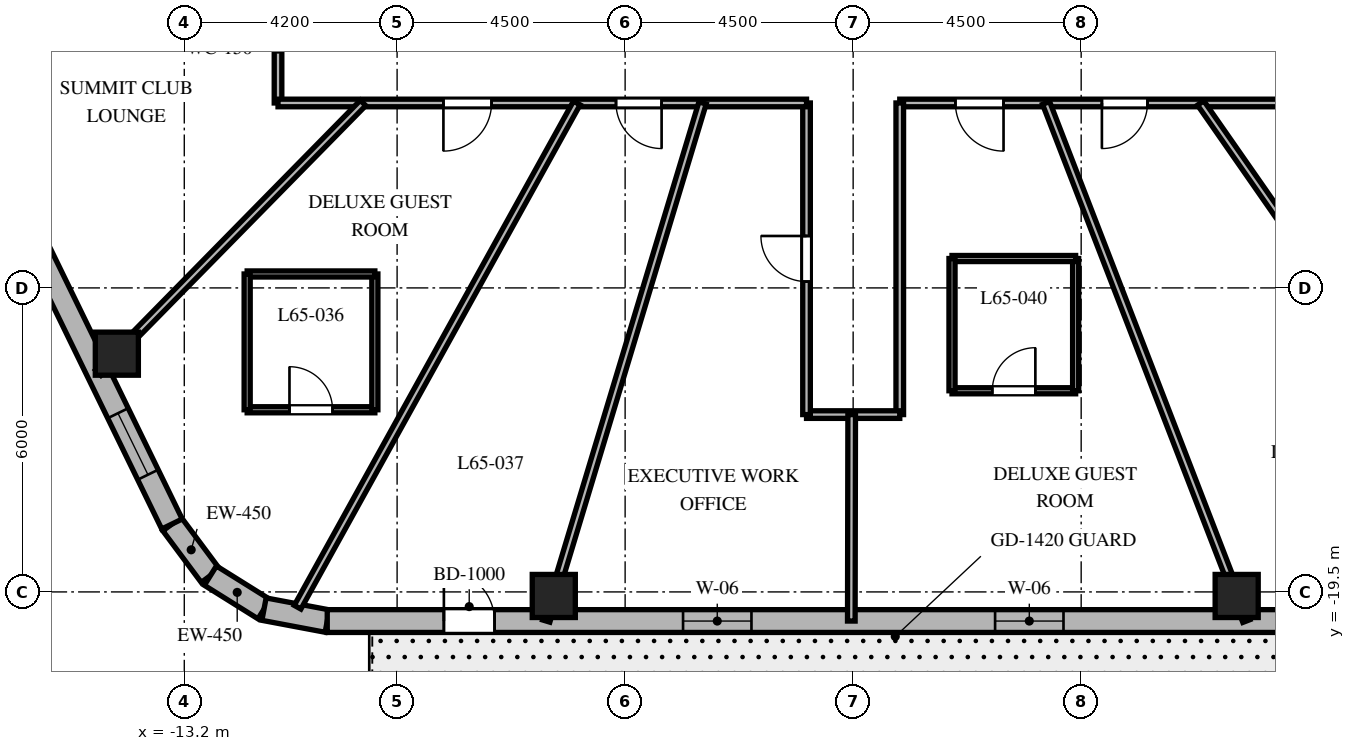
"""IFC4 building model, lengths in metres.
Left out: names, types, materials, properties, quantities, classifications, styles, units other than length and angle.
Written with IfcOpenShell. Run it as: python <this file> out.ifc"""

import sys

from ifc_helpers import new_model, si_unit, direction, frame, frame_2d, origin, origin_2d, place, context, subcontext, project, spatial, rectangle, extrude, element, fill, save


model = new_model("IFC4")
c1 = context("Model", 3, precision=1e-05, world=origin(), true_north=direction((0.0, 1.0)))
c2 = subcontext(c1, "Body", "Model", "MODEL_VIEW")
j1 = project(units=[si_unit("LENGTHUNIT", "METRE"), si_unit("PLANEANGLEUNIT", "RADIAN")], contexts=[c1])
p1 = place(None, origin())
s1 = spatial("IfcSite", under=j1, at=p1, CompositionType="ELEMENT")
p2 = place(p1, origin())
s2 = spatial("IfcBuilding", under=s1, at=p2, CompositionType="ELEMENT")
p3 = place(p2, frame((0.0, 0.0, 261.3)))
s3 = spatial("IfcBuildingStorey", under=s2, at=p3, CompositionType="ELEMENT", Elevation=261.3)
for number, where, z_axis, x_axis in (
    (1, (-5.908, -19.58, 0.0), (0.0, 0.0, 1.0), (1.0, 0.0, 0.0)),
    (2, (7.569, -19.58, 0.0), (0.0, 0.0, 1.0), (1.0, 0.0, 0.0)),
    (3, (-14.531, -14.798, 0.0), (0.0, 0.0, 1.0), (1.0, 0.0, 0.0)),
):
    element("IfcColumn", number, at=place(p3, frame(where, z_axis=z_axis, x_axis=x_axis)), inside=s3, PredefinedType="COLUMN", context=c2, shape_type="SweptSolid", body=[
        extrude(rectangle(XDim=0.85, YDim=0.85, at=origin_2d()), origin(), (0.0, 0.0, 1.0), 3.9),
    ])
p4 = place(p3, frame((-13.443, -18.16, 0.0), z_axis=(0.0, 0.0, 1.0), x_axis=(0.597042425808, -0.802209661987, 0.0)))
e4 = element("IfcWall", 4, at=p4, inside=s3, PredefinedType="SOLIDWALL", context=c2, shape_type="SweptSolid", body=[
    extrude(rectangle(XDim=1.27, YDim=0.45, at=frame_2d((0.635, 0.0))), origin(), (0.0, 0.0, 1.0), 3.6),
])
p5 = place(p3, frame((-12.685, -19.178, 0.0), z_axis=(0.0, 0.0, 1.0), x_axis=(0.848031272749, -0.529946186362, 0.0)))
e5 = element("IfcWall", 5, at=p5, inside=s3, PredefinedType="SOLIDWALL", context=c2, shape_type="SweptSolid", body=[
    extrude(rectangle(XDim=1.248, YDim=0.45, at=frame_2d((0.624, 0.0))), origin(), (0.0, 0.0, 1.0), 3.6),
])
p6 = place(p3, frame((-11.626, -19.84, 0.0), z_axis=(0.0, 0.0, 1.0), x_axis=(0.982701956681, -0.185194126083, 0.0)))
e6 = element("IfcWall", 6, at=p6, inside=s3, PredefinedType="SOLIDWALL", context=c2, shape_type="SweptSolid", body=[
    extrude(rectangle(XDim=1.27, YDim=0.45, at=frame_2d((0.635, 0.0))), origin(), (0.0, 0.0, 1.0), 3.6),
])
p7 = place(p3, frame((-10.379, -20.075, 0.0), z_axis=(0.0, 0.0, 1.0), x_axis=(1.0, 0.0, 0.0)))
e7 = element("IfcWall", 7, at=p7, inside=s3, PredefinedType="SOLIDWALL", context=c2, shape_type="SweptSolid", body=[
    extrude(rectangle(XDim=22.417, YDim=0.45, at=frame_2d((11.208, 0.0))), origin(), (0.0, 0.0, 1.0), 3.6),
])
p8 = place(p7, frame((2.302, 0.0, 0.0)))
e8 = element("IfcOpeningElement", 8, at=p8, cuts=e7, PredefinedType="OPENING", context=c2, shape_type="SweptSolid", body=[
    extrude(rectangle(XDim=1.0, YDim=2.15, at=frame_2d((0.5, 1.075))), frame((0.0, 0.235, 0.0), z_axis=(0.0, -1.0, 0.0), x_axis=(1.0, 0.0, 0.0)), (0.0, 0.0, 1.0), 0.47),
])
p9 = place(p7, frame((7.022, 0.0, 0.8)))
e9 = element("IfcOpeningElement", 9, at=p9, cuts=e7, PredefinedType="OPENING", context=c2, shape_type="SweptSolid", body=[
    extrude(rectangle(XDim=1.35, YDim=1.75, at=frame_2d((0.675, 0.875))), frame((0.0, 0.235, 0.0), z_axis=(0.0, -1.0, 0.0), x_axis=(1.0, 0.0, 0.0)), (0.0, 0.0, 1.0), 0.47),
])
p10 = place(p7, frame((13.18, 0.0, 0.8)))
e10 = element("IfcOpeningElement", 10, at=p10, cuts=e7, PredefinedType="OPENING", context=c2, shape_type="SweptSolid", body=[
    extrude(rectangle(XDim=1.35, YDim=1.75, at=frame_2d((0.675, 0.875))), frame((0.0, 0.235, 0.0), z_axis=(0.0, -1.0, 0.0), x_axis=(1.0, 0.0, 0.0)), (0.0, 0.0, 1.0), 0.47),
])
p11 = place(p7, frame((19.587, 0.0, 0.8)))
e11 = element("IfcOpeningElement", 11, at=p11, cuts=e7, PredefinedType="OPENING", context=c2, shape_type="SweptSolid", body=[
    extrude(rectangle(XDim=1.35, YDim=1.75, at=frame_2d((0.675, 0.875))), frame((0.0, 0.235, 0.0), z_axis=(0.0, -1.0, 0.0), x_axis=(1.0, 0.0, 0.0)), (0.0, 0.0, 1.0), 0.47),
])
p12 = place(p3, frame((-21.138, -2.371, 0.0), z_axis=(0.0, 0.0, 1.0), x_axis=(0.438128124058, -0.89891253574, 0.0)))
e12 = element("IfcWall", 12, at=p12, inside=s3, PredefinedType="SOLIDWALL", context=c2, shape_type="SweptSolid", body=[
    extrude(rectangle(XDim=17.565, YDim=0.45, at=frame_2d((8.782, 0.0))), origin(), (0.0, 0.0, 1.0), 3.6),
])
p13 = place(p12, frame((1.133, 0.0, 0.8)))
e13 = element("IfcOpeningElement", 13, at=p13, cuts=e12, PredefinedType="OPENING", context=c2, shape_type="SweptSolid", body=[
    extrude(rectangle(XDim=1.35, YDim=1.75, at=frame_2d((0.675, 0.875))), frame((0.0, 0.235, 0.0), z_axis=(0.0, -1.0, 0.0), x_axis=(1.0, 0.0, 0.0)), (0.0, 0.0, 1.0), 0.47),
])
p14 = place(p12, frame((8.158, 0.0, 0.8)))
e14 = element("IfcOpeningElement", 14, at=p14, cuts=e12, PredefinedType="OPENING", context=c2, shape_type="SweptSolid", body=[
    extrude(rectangle(XDim=1.35, YDim=1.75, at=frame_2d((0.675, 0.875))), frame((0.0, 0.235, 0.0), z_axis=(0.0, -1.0, 0.0), x_axis=(1.0, 0.0, 0.0)), (0.0, 0.0, 1.0), 0.47),
])
p15 = place(p12, frame((15.132, 0.0, 0.8)))
e15 = element("IfcOpeningElement", 15, at=p15, cuts=e12, PredefinedType="OPENING", context=c2, shape_type="SweptSolid", body=[
    extrude(rectangle(XDim=1.35, YDim=1.75, at=frame_2d((0.675, 0.875))), frame((0.0, 0.235, 0.0), z_axis=(0.0, -1.0, 0.0), x_axis=(1.0, 0.0, 0.0)), (0.0, 0.0, 1.0), 0.47),
])
p16 = place(p3, frame((-11.35, -9.85, 0.0), z_axis=(0.0, 0.0, 1.0), x_axis=(0.0, 1.0, 0.0)))
e16 = element("IfcWall", 16, at=p16, inside=s3, PredefinedType="PARTITIONING", context=c2, shape_type="SweptSolid", body=[
    extrude(rectangle(XDim=12.4, YDim=0.15, at=frame_2d((6.2, 0.0))), origin(), (0.0, 0.0, 1.0), 3.09),
])
p17 = place(p16, frame((10.333, 0.0, 0.0)))
e17 = element("IfcOpeningElement", 17, at=p17, cuts=e16, PredefinedType="OPENING", context=c2, shape_type="SweptSolid", body=[
    extrude(rectangle(XDim=0.9, YDim=2.03, at=frame_2d((0.45, 1.015))), frame((0.0, 0.085, 0.0), z_axis=(0.0, -1.0, 0.0), x_axis=(1.0, 0.0, 0.0)), (0.0, 0.0, 1.0), 0.17),
])
p18 = place(p16, frame((7.697, 0.0, 0.0)))
e18 = element("IfcOpeningElement", 18, at=p18, cuts=e16, PredefinedType="OPENING", context=c2, shape_type="SweptSolid", body=[
    extrude(rectangle(XDim=0.95, YDim=2.03, at=frame_2d((0.475, 1.015))), frame((0.0, 0.085, 0.0), z_axis=(0.0, -1.0, 0.0), x_axis=(1.0, 0.0, 0.0)), (0.0, 0.0, 1.0), 0.17),
])
p19 = place(p16, frame((2.998, 0.0, 0.0)))
e19 = element("IfcOpeningElement", 19, at=p19, cuts=e16, PredefinedType="OPENING", context=c2, shape_type="SweptSolid", body=[
    extrude(rectangle(XDim=0.95, YDim=2.03, at=frame_2d((0.475, 1.015))), frame((0.0, 0.085, 0.0), z_axis=(0.0, -1.0, 0.0), x_axis=(1.0, 0.0, 0.0)), (0.0, 0.0, 1.0), 0.17),
])
p20 = place(p3, frame((11.35, -9.85, 0.0), z_axis=(0.0, 0.0, 1.0), x_axis=(-1.0, 0.0, 0.0)))
e20 = element("IfcWall", 20, at=p20, inside=s3, PredefinedType="PARTITIONING", context=c2, shape_type="SweptSolid", body=[
    extrude(rectangle(XDim=10.43, YDim=0.15, at=frame_2d((5.215, 0.0))), origin(), (0.0, 0.0, 1.0), 3.09),
])
p21 = place(p20, frame((8.382, 0.0, 0.0)))
e21 = element("IfcOpeningElement", 21, at=p21, cuts=e20, PredefinedType="OPENING", context=c2, shape_type="SweptSolid", body=[
    extrude(rectangle(XDim=0.95, YDim=2.03, at=frame_2d((0.475, 1.015))), frame((0.0, 0.085, 0.0), z_axis=(0.0, -1.0, 0.0), x_axis=(1.0, 0.0, 0.0)), (0.0, 0.0, 1.0), 0.17),
])
p22 = place(p20, frame((5.541, 0.0, 0.0)))
e22 = element("IfcOpeningElement", 22, at=p22, cuts=e20, PredefinedType="OPENING", context=c2, shape_type="SweptSolid", body=[
    extrude(rectangle(XDim=0.9, YDim=2.03, at=frame_2d((0.45, 1.015))), frame((0.0, 0.085, 0.0), z_axis=(0.0, -1.0, 0.0), x_axis=(1.0, 0.0, 0.0)), (0.0, 0.0, 1.0), 0.17),
])
p23 = place(p20, frame((1.916, 0.0, 0.0)))
e23 = element("IfcOpeningElement", 23, at=p23, cuts=e20, PredefinedType="OPENING", context=c2, shape_type="SweptSolid", body=[
    extrude(rectangle(XDim=0.9, YDim=2.03, at=frame_2d((0.45, 1.015))), frame((0.0, 0.085, 0.0), z_axis=(0.0, -1.0, 0.0), x_axis=(1.0, 0.0, 0.0)), (0.0, 0.0, 1.0), 0.17),
])
p24 = place(p3, frame((0.92, -9.85, 0.0), z_axis=(0.0, 0.0, 1.0), x_axis=(0.0, -1.0, 0.0)))
e24 = element("IfcWall", 24, at=p24, inside=s3, PredefinedType="PARTITIONING", context=c2, shape_type="SweptSolid", body=[
    extrude(rectangle(XDim=6.15, YDim=0.15, at=frame_2d((3.075, 0.0))), origin(), (0.0, 0.0, 1.0), 3.041),
])
p25 = place(p3, frame((0.92, -16.0, 0.0), z_axis=(0.0, 0.0, 1.0), x_axis=(-1.0, 0.0, 0.0)))
e25 = element("IfcWall", 25, at=p25, inside=s3, PredefinedType="PARTITIONING", context=c2, shape_type="SweptSolid", body=[
    extrude(rectangle(XDim=1.84, YDim=0.15, at=frame_2d((0.92, 0.0))), origin(), (0.0, 0.0, 1.0), 3.6),
])
p26 = place(p3, frame((-0.92, -16.0, 0.0), z_axis=(0.0, 0.0, 1.0), x_axis=(0.0, 1.0, 0.0)))
e26 = element("IfcWall", 26, at=p26, inside=s3, PredefinedType="PARTITIONING", context=c2, shape_type="SweptSolid", body=[
    extrude(rectangle(XDim=6.15, YDim=0.15, at=frame_2d((3.075, 0.0))), origin(), (0.0, 0.0, 1.0), 3.041),
])
p27 = place(p26, frame((2.625, 0.0, 0.0)))
e27 = element("IfcOpeningElement", 27, at=p27, cuts=e26, PredefinedType="OPENING", context=c2, shape_type="SweptSolid", body=[
    extrude(rectangle(XDim=0.9, YDim=2.03, at=frame_2d((0.45, 1.015))), frame((0.0, 0.085, 0.0), z_axis=(0.0, -1.0, 0.0), x_axis=(1.0, 0.0, 0.0)), (0.0, 0.0, 1.0), 0.17),
])
p28 = place(p3, frame((-0.92, -9.85, 0.0), z_axis=(0.0, 0.0, 1.0), x_axis=(-1.0, 0.0, 0.0)))
e28 = element("IfcWall", 28, at=p28, inside=s3, PredefinedType="PARTITIONING", context=c2, shape_type="SweptSolid", body=[
    extrude(rectangle(XDim=10.43, YDim=0.15, at=frame_2d((5.215, 0.0))), origin(), (0.0, 0.0, 1.0), 3.09),
])
p29 = place(p28, frame((6.216, 0.0, 0.0)))
e29 = element("IfcOpeningElement", 29, at=p29, cuts=e28, PredefinedType="OPENING", context=c2, shape_type="SweptSolid", body=[
    extrude(rectangle(XDim=0.95, YDim=2.03, at=frame_2d((0.475, 1.015))), frame((0.0, 0.085, 0.0), z_axis=(0.0, -1.0, 0.0), x_axis=(1.0, 0.0, 0.0)), (0.0, 0.0, 1.0), 0.17),
])
p30 = place(p28, frame((2.86, 0.0, 0.0)))
e30 = element("IfcOpeningElement", 30, at=p30, cuts=e28, PredefinedType="OPENING", context=c2, shape_type="SweptSolid", body=[
    extrude(rectangle(XDim=0.9, YDim=2.03, at=frame_2d((0.45, 1.015))), frame((0.0, 0.085, 0.0), z_axis=(0.0, -1.0, 0.0), x_axis=(1.0, 0.0, 0.0)), (0.0, 0.0, 1.0), 0.17),
])
p31 = place(p3, frame((-9.672, -9.85, 0.0), z_axis=(0.0, 0.0, 1.0), x_axis=(-0.700629771301, -0.713524998558, 0.0)))
e31 = element("IfcWall", 31, at=p31, inside=s3, PredefinedType="PARTITIONING", context=c2, shape_type="SweptSolid", body=[
    extrude(rectangle(XDim=7.459, YDim=0.15, at=frame_2d((3.73, 0.0))), origin(), (0.0, 0.0, 1.0), 2.94),
])
p32 = place(p3, frame((-5.454, -9.85, 0.0), z_axis=(0.0, 0.0, 1.0), x_axis=(-0.48439420613, -0.874849846012, 0.0)))
e32 = element("IfcWall", 32, at=p32, inside=s3, PredefinedType="PARTITIONING", context=c2, shape_type="SweptSolid", body=[
    extrude(rectangle(XDim=11.375, YDim=0.15, at=frame_2d((5.688, 0.0))), origin(), (0.0, 0.0, 1.0), 2.94),
])
p33 = place(p3, frame((-2.972, -9.85, 0.0), z_axis=(0.0, 0.0, 1.0), x_axis=(-0.288872169679, -0.957367677324, 0.0)))
e33 = element("IfcWall", 33, at=p33, inside=s3, PredefinedType="PARTITIONING", context=c2, shape_type="SweptSolid", body=[
    extrude(rectangle(XDim=10.68, YDim=0.15, at=frame_2d((5.34, 0.0))), origin(), (0.0, 0.0, 1.0), 2.94),
])
p34 = place(p3, frame((-0.029, -16.0, 0.0), z_axis=(0.0, 0.0, 1.0), x_axis=(-0.001797372928, -0.999998384724, 0.0)))
e34 = element("IfcWall", 34, at=p34, inside=s3, PredefinedType="PARTITIONING", context=c2, shape_type="SweptSolid", body=[
    extrude(rectangle(XDim=4.075, YDim=0.15, at=frame_2d((2.038, 0.0))), origin(), (0.0, 0.0, 1.0), 2.94),
])
p35 = place(p3, frame((3.808, -9.85, 0.0), z_axis=(0.0, 0.0, 1.0), x_axis=(0.360587327934, -0.932725457427, 0.0)))
e35 = element("IfcWall", 35, at=p35, inside=s3, PredefinedType="PARTITIONING", context=c2, shape_type="SweptSolid", body=[
    extrude(rectangle(XDim=10.962, YDim=0.15, at=frame_2d((5.481, 0.0))), origin(), (0.0, 0.0, 1.0), 2.94),
])
p36 = place(p3, frame((6.858, -9.85, 0.0), z_axis=(0.0, 0.0, 1.0), x_axis=(0.571391702066, -0.820677477948, 0.0)))
e36 = element("IfcWall", 36, at=p36, inside=s3, PredefinedType="PARTITIONING", context=c2, shape_type="SweptSolid", body=[
    extrude(rectangle(XDim=11.738, YDim=0.15, at=frame_2d((5.869, 0.0))), origin(), (0.0, 0.0, 1.0), 2.94),
])
p37 = place(p3, frame((-11.959, -15.905, 0.0), z_axis=(0.0, 0.0, 1.0), x_axis=(1.0, 0.0, 0.0)))
e37 = element("IfcWall", 37, at=p37, inside=s3, PredefinedType="PARTITIONING", context=c2, shape_type="SweptSolid", body=[
    extrude(rectangle(XDim=2.52, YDim=0.12, at=frame_2d((1.26, 0.0))), origin(), (0.0, 0.0, 1.0), 3.6),
])
p38 = place(p37, frame((0.835, 0.0, 0.0)))
e38 = element("IfcOpeningElement", 38, at=p38, cuts=e37, PredefinedType="OPENING", context=c2, shape_type="SweptSolid", body=[
    extrude(rectangle(XDim=0.85, YDim=2.03, at=frame_2d((0.425, 1.015))), frame((0.0, 0.07, 0.0), z_axis=(0.0, -1.0, 0.0), x_axis=(1.0, 0.0, 0.0)), (0.0, 0.0, 1.0), 0.14),
])
p39 = place(p3, frame((-9.439, -15.905, 0.0), z_axis=(0.0, 0.0, 1.0), x_axis=(0.0, 1.0, 0.0)))
e39 = element("IfcWall", 39, at=p39, inside=s3, PredefinedType="PARTITIONING", context=c2, shape_type="SweptSolid", body=[
    extrude(rectangle(XDim=2.68, YDim=0.12, at=frame_2d((1.34, 0.0))), origin(), (0.0, 0.0, 1.0), 3.172),
])
p40 = place(p3, frame((-9.439, -13.225, 0.0), z_axis=(0.0, 0.0, 1.0), x_axis=(-1.0, 0.0, 0.0)))
e40 = element("IfcWall", 40, at=p40, inside=s3, PredefinedType="PARTITIONING", context=c2, shape_type="SweptSolid", body=[
    extrude(rectangle(XDim=2.52, YDim=0.12, at=frame_2d((1.26, 0.0))), origin(), (0.0, 0.0, 1.0), 3.172),
])
p41 = place(p3, frame((-11.959, -13.225, 0.0), z_axis=(0.0, 0.0, 1.0), x_axis=(0.0, -1.0, 0.0)))
e41 = element("IfcWall", 41, at=p41, inside=s3, PredefinedType="PARTITIONING", context=c2, shape_type="SweptSolid", body=[
    extrude(rectangle(XDim=2.68, YDim=0.12, at=frame_2d((1.34, 0.0))), origin(), (0.0, 0.0, 1.0), 3.6),
])
p42 = place(p3, frame((1.951, -15.53, 0.0), z_axis=(0.0, 0.0, 1.0), x_axis=(1.0, 0.0, 0.0)))
e42 = element("IfcWall", 42, at=p42, inside=s3, PredefinedType="PARTITIONING", context=c2, shape_type="SweptSolid", body=[
    extrude(rectangle(XDim=2.44, YDim=0.12, at=frame_2d((1.22, 0.0))), origin(), (0.0, 0.0, 1.0), 3.041),
])
p43 = place(p42, frame((0.795, 0.0, 0.0)))
e43 = element("IfcOpeningElement", 43, at=p43, cuts=e42, PredefinedType="OPENING", context=c2, shape_type="SweptSolid", body=[
    extrude(rectangle(XDim=0.85, YDim=2.03, at=frame_2d((0.425, 1.015))), frame((0.0, 0.07, 0.0), z_axis=(0.0, -1.0, 0.0), x_axis=(1.0, 0.0, 0.0)), (0.0, 0.0, 1.0), 0.14),
])
p44 = place(p3, frame((4.391, -15.53, 0.0), z_axis=(0.0, 0.0, 1.0), x_axis=(0.0, 1.0, 0.0)))
e44 = element("IfcWall", 44, at=p44, inside=s3, PredefinedType="PARTITIONING", context=c2, shape_type="SweptSolid", body=[
    extrude(rectangle(XDim=2.61, YDim=0.12, at=frame_2d((1.305, 0.0))), origin(), (0.0, 0.0, 1.0), 3.126),
])
p45 = place(p3, frame((4.391, -12.92, 0.0), z_axis=(0.0, 0.0, 1.0), x_axis=(-1.0, 0.0, 0.0)))
e45 = element("IfcWall", 45, at=p45, inside=s3, PredefinedType="PARTITIONING", context=c2, shape_type="SweptSolid", body=[
    extrude(rectangle(XDim=2.44, YDim=0.12, at=frame_2d((1.22, 0.0))), origin(), (0.0, 0.0, 1.0), 3.126),
])
p46 = place(p3, frame((1.951, -12.92, 0.0), z_axis=(0.0, 0.0, 1.0), x_axis=(0.0, -1.0, 0.0)))
e46 = element("IfcWall", 46, at=p46, inside=s3, PredefinedType="PARTITIONING", context=c2, shape_type="SweptSolid", body=[
    extrude(rectangle(XDim=2.61, YDim=0.12, at=frame_2d((1.305, 0.0))), origin(), (0.0, 0.0, 1.0), 3.126),
])
p47 = place(p8, origin())
e47 = element("IfcDoor", 47, at=p47, inside=s3, OperationType="SINGLE_SWING_LEFT", PredefinedType="DOOR", context=c2, shape_type="SweptSolid", body=[
    extrude(rectangle(XDim=1.0, YDim=2.15, at=frame_2d((0.5, 1.075))), frame((0.0, 0.025, 0.0), z_axis=(0.0, -1.0, 0.0), x_axis=(1.0, 0.0, 0.0)), (0.0, 0.0, 1.0), 0.05),
])
fill(e8, e47)
p48 = place(p9, origin())
e48 = element("IfcWindow", 48, at=p48, inside=s3, PartitioningType="SINGLE_PANEL", PredefinedType="WINDOW", context=c2, shape_type="SweptSolid", body=[
    extrude(rectangle(XDim=1.35, YDim=1.75, at=frame_2d((0.675, 0.875))), frame((0.0, 0.03, 0.0), z_axis=(0.0, -1.0, 0.0), x_axis=(1.0, 0.0, 0.0)), (0.0, 0.0, 1.0), 0.06),
])
fill(e9, e48)
p49 = place(p10, origin())
e49 = element("IfcWindow", 49, at=p49, inside=s3, PartitioningType="SINGLE_PANEL", PredefinedType="WINDOW", context=c2, shape_type="SweptSolid", body=[
    extrude(rectangle(XDim=1.35, YDim=1.75, at=frame_2d((0.675, 0.875))), frame((0.0, 0.03, 0.0), z_axis=(0.0, -1.0, 0.0), x_axis=(1.0, 0.0, 0.0)), (0.0, 0.0, 1.0), 0.06),
])
fill(e10, e49)
p50 = place(p15, origin())
e50 = element("IfcWindow", 50, at=p50, inside=s3, PartitioningType="SINGLE_PANEL", PredefinedType="WINDOW", context=c2, shape_type="SweptSolid", body=[
    extrude(rectangle(XDim=1.35, YDim=1.75, at=frame_2d((0.675, 0.875))), frame((0.0, 0.03, 0.0), z_axis=(0.0, -1.0, 0.0), x_axis=(1.0, 0.0, 0.0)), (0.0, 0.0, 1.0), 0.06),
])
fill(e15, e50)
p51 = place(p29, origin())
e51 = element("IfcDoor", 51, at=p51, inside=s3, OperationType="SINGLE_SWING_RIGHT", PredefinedType="DOOR", context=c2, shape_type="SweptSolid", body=[
    extrude(rectangle(XDim=0.95, YDim=2.03, at=frame_2d((0.475, 1.015))), frame((0.0, 0.025, 0.0), z_axis=(0.0, -1.0, 0.0), x_axis=(1.0, 0.0, 0.0)), (0.0, 0.0, 1.0), 0.05),
])
fill(e29, e51)
p52 = place(p38, origin())
e52 = element("IfcDoor", 52, at=p52, inside=s3, OperationType="SINGLE_SWING_LEFT", PredefinedType="DOOR", context=c2, shape_type="SweptSolid", body=[
    extrude(rectangle(XDim=0.85, YDim=2.03, at=frame_2d((0.425, 1.015))), frame((0.0, 0.025, 0.0), z_axis=(0.0, -1.0, 0.0), x_axis=(1.0, 0.0, 0.0)), (0.0, 0.0, 1.0), 0.05),
])
fill(e38, e52)
p53 = place(p30, origin())
e53 = element("IfcDoor", 53, at=p53, inside=s3, OperationType="SINGLE_SWING_LEFT", PredefinedType="DOOR", context=c2, shape_type="SweptSolid", body=[
    extrude(rectangle(XDim=0.9, YDim=2.03, at=frame_2d((0.45, 1.015))), frame((0.0, 0.025, 0.0), z_axis=(0.0, -1.0, 0.0), x_axis=(1.0, 0.0, 0.0)), (0.0, 0.0, 1.0), 0.05),
])
fill(e30, e53)
p54 = place(p27, origin())
e54 = element("IfcDoor", 54, at=p54, inside=s3, OperationType="SINGLE_SWING_RIGHT", PredefinedType="DOOR", context=c2, shape_type="SweptSolid", body=[
    extrude(rectangle(XDim=0.9, YDim=2.03, at=frame_2d((0.45, 1.015))), frame((0.0, 0.025, 0.0), z_axis=(0.0, -1.0, 0.0), x_axis=(1.0, 0.0, 0.0)), (0.0, 0.0, 1.0), 0.05),
])
fill(e27, e54)
p55 = place(p21, origin())
e55 = element("IfcDoor", 55, at=p55, inside=s3, OperationType="SINGLE_SWING_LEFT", PredefinedType="DOOR", context=c2, shape_type="SweptSolid", body=[
    extrude(rectangle(XDim=0.95, YDim=2.03, at=frame_2d((0.475, 1.015))), frame((0.0, 0.025, 0.0), z_axis=(0.0, -1.0, 0.0), x_axis=(1.0, 0.0, 0.0)), (0.0, 0.0, 1.0), 0.05),
])
fill(e21, e55)
p56 = place(p43, origin())
e56 = element("IfcDoor", 56, at=p56, inside=s3, OperationType="SINGLE_SWING_RIGHT", PredefinedType="DOOR", context=c2, shape_type="SweptSolid", body=[
    extrude(rectangle(XDim=0.85, YDim=2.03, at=frame_2d((0.425, 1.015))), frame((0.0, 0.025, 0.0), z_axis=(0.0, -1.0, 0.0), x_axis=(1.0, 0.0, 0.0)), (0.0, 0.0, 1.0), 0.05),
])
fill(e43, e56)
p57 = place(p22, origin())
e57 = element("IfcDoor", 57, at=p57, inside=s3, OperationType="SINGLE_SWING_RIGHT", PredefinedType="DOOR", context=c2, shape_type="SweptSolid", body=[
    extrude(rectangle(XDim=0.9, YDim=2.03, at=frame_2d((0.45, 1.015))), frame((0.0, 0.025, 0.0), z_axis=(0.0, -1.0, 0.0), x_axis=(1.0, 0.0, 0.0)), (0.0, 0.0, 1.0), 0.05),
])
fill(e22, e57)
save(model, sys.argv[1])
